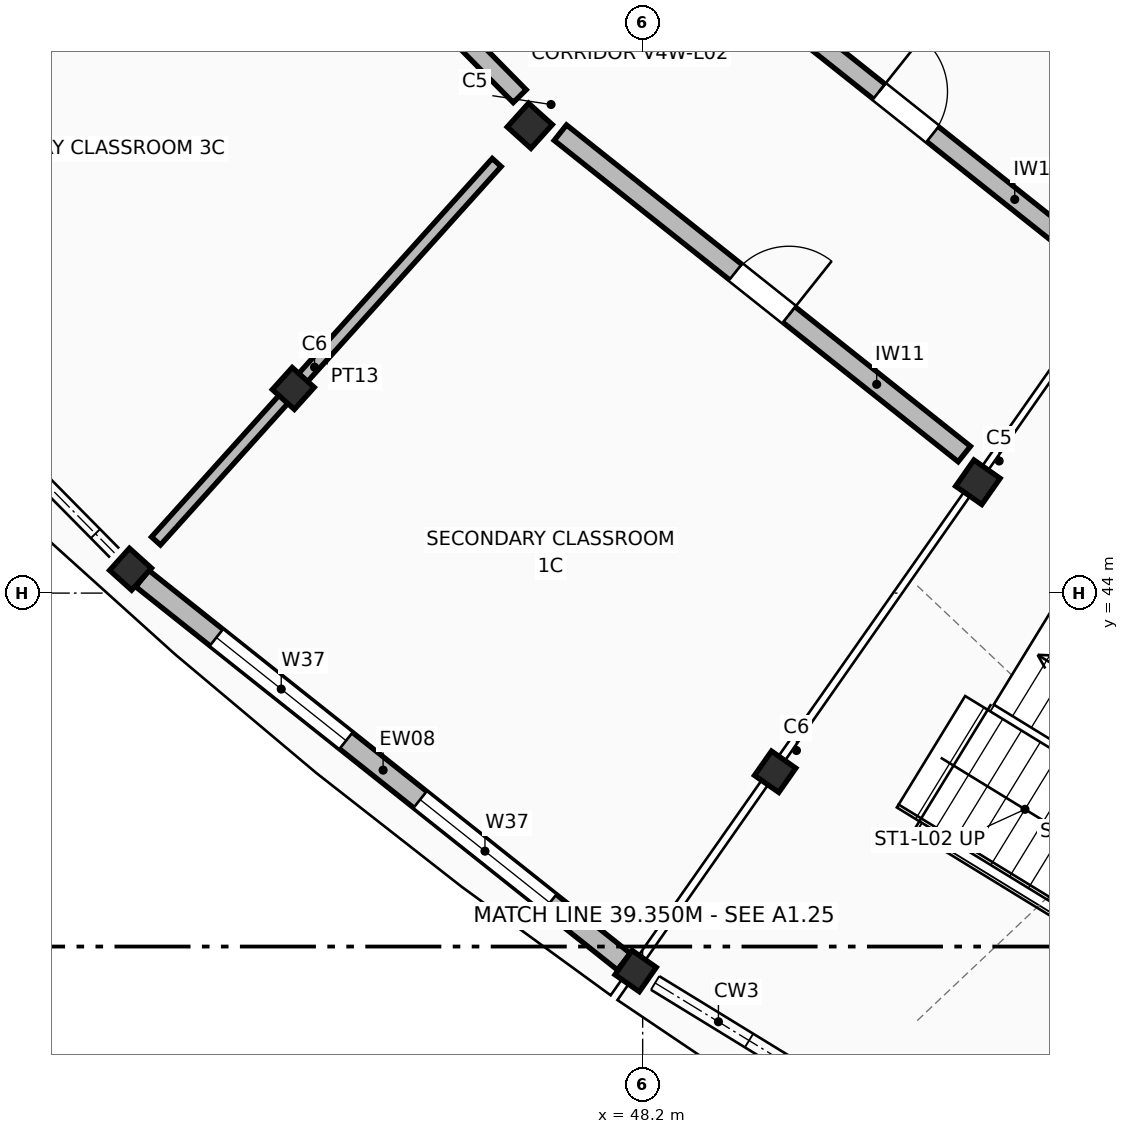
"""IFC4 building model, lengths in metres.
Left out: names, types, materials, properties, quantities, classifications, styles, units other than length and angle.
Written with IfcOpenShell. Run it as: python <this file> out.ifc"""

import sys

from ifc_helpers import new_model, si_unit, direction, frame, frame_2d, origin, origin_2d, place, context, subcontext, project, spatial, rectangle, extrude, element, fill, save


model = new_model("IFC4")
c1 = context("Model", 3, precision=1e-05, world=origin(), true_north=direction((0.0, 1.0)))
c2 = subcontext(c1, "Body", "Model", "MODEL_VIEW")
j1 = project(units=[si_unit("LENGTHUNIT", "METRE"), si_unit("PLANEANGLEUNIT", "RADIAN")], contexts=[c1])
p1 = place(None, origin())
s1 = spatial("IfcSite", under=j1, at=p1, CompositionType="ELEMENT")
p2 = place(p1, origin())
s2 = spatial("IfcBuilding", under=s1, at=p2, CompositionType="ELEMENT")
p3 = place(p2, frame((0.0, 0.0, 8.16)))
s3 = spatial("IfcBuildingStorey", under=s2, at=p3, CompositionType="ELEMENT", Elevation=8.16)
p4 = place(p3, frame((46.715, 50.148, 0.0), z_axis=(0.0, 0.0, 1.0), x_axis=(-0.669130606359, -0.743144825477, 0.0)))
e1 = element("IfcColumn", 1, at=p4, inside=s3, PredefinedType="COLUMN", context=c2, shape_type="SweptSolid", body=[
    extrude(rectangle(XDim=0.42, YDim=0.42, at=origin_2d()), origin(), (0.0, 0.0, 1.0), 3.74),
])
for number, where, z_axis, x_axis in (
    (2, (43.603, 46.692, 0.0), (0.0, 0.0, 1.0), (-0.669, -0.743, 0.0)),
    (3, (41.462, 44.314, 0.0), (0.0, 0.0, 1.0), (-0.669, -0.743, 0.0)),
):
    element("IfcColumn", number, at=place(p3, frame(where, z_axis=z_axis, x_axis=x_axis)), inside=s3, PredefinedType="COLUMN", context=c2, shape_type="SweptSolid", body=[
        extrude(rectangle(XDim=0.39, YDim=0.39, at=origin_2d()), origin(), (0.0, 0.0, 1.0), 3.74),
    ])
p5 = place(p3, frame((52.61, 45.458, 0.0), z_axis=(0.0, 0.0, 1.0), x_axis=(-0.573576436351, -0.819152044289, 0.0)))
e4 = element("IfcColumn", 4, at=p5, inside=s3, PredefinedType="COLUMN", context=c2, shape_type="SweptSolid", body=[
    extrude(rectangle(XDim=0.42, YDim=0.42, at=origin_2d()), origin(), (0.0, 0.0, 1.0), 3.74),
])
for number, where, z_axis, x_axis in (
    (5, (49.943, 41.649, 0.0), (0.0, 0.0, 1.0), (-0.574, -0.819, 0.0)),
    (6, (48.108, 39.028, 0.0), (0.0, 0.0, 1.0), (-0.574, -0.819, 0.0)),
):
    element("IfcColumn", number, at=place(p3, frame(where, z_axis=z_axis, x_axis=x_axis)), inside=s3, PredefinedType="COLUMN", context=c2, shape_type="SweptSolid", body=[
        extrude(rectangle(XDim=0.39, YDim=0.39, at=origin_2d()), origin(), (0.0, 0.0, 1.0), 3.74),
    ])
p6 = place(p3, frame((41.617, 44.191, 0.0), z_axis=(0.0, 0.0, 1.0), x_axis=(0.782610403329, -0.62251181242, 0.0)))
e7 = element("IfcWall", 7, at=p6, inside=s3, PredefinedType="STANDARD", context=c2, shape_type="SweptSolid", body=[
    extrude(rectangle(XDim=8.096, YDim=0.276, at=frame_2d((4.048, 0.0))), origin(), (0.0, 0.0, 1.0), 2.78),
])
p7 = place(p6, frame((1.245, 0.0, 0.95)))
e8 = element("IfcOpeningElement", 8, at=p7, cuts=e7, PredefinedType="OPENING", context=c2, shape_type="SweptSolid", body=[
    extrude(rectangle(XDim=2.18, YDim=1.15, at=frame_2d((1.09, 0.575))), frame((0.0, 0.148, 0.0), z_axis=(0.0, -1.0, 0.0), x_axis=(1.0, 0.0, 0.0)), (0.0, 0.0, 1.0), 0.296),
])
p8 = place(p6, frame((4.671, 0.0, 0.95)))
e9 = element("IfcOpeningElement", 9, at=p8, cuts=e7, PredefinedType="OPENING", context=c2, shape_type="SweptSolid", body=[
    extrude(rectangle(XDim=2.18, YDim=1.15, at=frame_2d((1.09, 0.575))), frame((0.0, 0.148, 0.0), z_axis=(0.0, -1.0, 0.0), x_axis=(1.0, 0.0, 0.0)), (0.0, 0.0, 1.0), 0.296),
])
p9 = place(p3, frame((41.989, 55.193, 0.0), z_axis=(0.0, 0.0, 1.0), x_axis=(0.702368484449, -0.711813537419, 0.0)))
e10 = element("IfcWall", 10, at=p9, inside=s3, PredefinedType="STANDARD", context=c2, shape_type="SweptSolid", body=[
    extrude(rectangle(XDim=6.54, YDim=0.24, at=frame_2d((3.27, 0.0))), origin(), (0.0, 0.0, 1.0), 2.75),
])
p10 = place(p9, frame((2.82, 0.0, 0.0)))
e11 = element("IfcOpeningElement", 11, at=p10, cuts=e10, PredefinedType="OPENING", context=c2, shape_type="SweptSolid", body=[
    extrude(rectangle(XDim=0.9, YDim=2.12, at=frame_2d((0.45, 1.06))), frame((0.0, 0.13, 0.0), z_axis=(0.0, -1.0, 0.0), x_axis=(1.0, 0.0, 0.0)), (0.0, 0.0, 1.0), 0.26),
])
p11 = place(p3, frame((49.151, 52.317, 0.0), z_axis=(0.0, 0.0, 1.0), x_axis=(0.782605685559, -0.622517743467, 0.0)))
e12 = element("IfcWall", 12, at=p11, inside=s3, PredefinedType="STANDARD", context=c2, shape_type="SweptSolid", body=[
    extrude(rectangle(XDim=6.42, YDim=0.25, at=frame_2d((3.21, 0.0))), origin(), (0.0, 0.0, 1.0), 2.75),
])
p12 = place(p11, frame((2.76, 0.0, 0.0)))
e13 = element("IfcOpeningElement", 13, at=p12, cuts=e12, PredefinedType="OPENING", context=c2, shape_type="SweptSolid", body=[
    extrude(rectangle(XDim=0.9, YDim=2.18, at=frame_2d((0.45, 1.09))), frame((0.0, 0.135, 0.0), z_axis=(0.0, -1.0, 0.0), x_axis=(1.0, 0.0, 0.0)), (0.0, 0.0, 1.0), 0.27),
])
p13 = place(p3, frame((47.117, 50.058, 0.0), z_axis=(0.0, 0.0, 1.0), x_axis=(0.782615780998, -0.622505051653, 0.0)))
e14 = element("IfcWall", 14, at=p13, inside=s3, PredefinedType="STANDARD", context=c2, shape_type="SweptSolid", body=[
    extrude(rectangle(XDim=6.792, YDim=0.26, at=frame_2d((3.396, 0.0))), origin(), (0.0, 0.0, 1.0), 2.75),
])
p14 = place(p13, frame((2.946, 0.0, 0.0)))
e15 = element("IfcOpeningElement", 15, at=p14, cuts=e14, PredefinedType="OPENING", context=c2, shape_type="SweptSolid", body=[
    extrude(rectangle(XDim=0.9, YDim=2.24, at=frame_2d((0.45, 1.12))), frame((0.0, 0.14, 0.0), z_axis=(0.0, -1.0, 0.0), x_axis=(1.0, 0.0, 0.0)), (0.0, 0.0, 1.0), 0.28),
])
p15 = place(p3, frame((46.28, 49.665, 0.0), z_axis=(0.0, 0.0, 1.0), x_axis=(-0.669115705072, -0.743158242386, 0.0)))
e16 = element("IfcWall", 16, at=p15, inside=s3, PredefinedType="PARTITIONING", context=c2, shape_type="SweptSolid", body=[
    extrude(rectangle(XDim=6.7, YDim=0.158, at=frame_2d((3.35, 0.0))), origin(), (0.0, 0.0, 1.0), 2.75),
])
p16 = place(p7, origin())
e17 = element("IfcWindow", 17, at=p16, inside=s3, PartitioningType="SINGLE_PANEL", PredefinedType="WINDOW", context=c2, shape_type="SweptSolid", body=[
    extrude(rectangle(XDim=2.18, YDim=1.15, at=frame_2d((1.09, 0.575))), frame((0.0, 0.03, 0.0), z_axis=(0.0, -1.0, 0.0), x_axis=(1.0, 0.0, 0.0)), (0.0, 0.0, 1.0), 0.06),
])
fill(e8, e17)
p17 = place(p8, origin())
e18 = element("IfcWindow", 18, at=p17, inside=s3, PartitioningType="SINGLE_PANEL", PredefinedType="WINDOW", context=c2, shape_type="SweptSolid", body=[
    extrude(rectangle(XDim=2.18, YDim=1.15, at=frame_2d((1.09, 0.575))), frame((0.0, 0.03, 0.0), z_axis=(0.0, -1.0, 0.0), x_axis=(1.0, 0.0, 0.0)), (0.0, 0.0, 1.0), 0.06),
])
fill(e9, e18)
p18 = place(p12, frame((0.9, 0.0, 0.0), z_axis=(0.0, 0.0, 1.0), x_axis=(-1.0, 0.0, 0.0)))
e19 = element("IfcDoor", 19, at=p18, inside=s3, OperationType="SINGLE_SWING_LEFT", PredefinedType="DOOR", context=c2, shape_type="SweptSolid", body=[
    extrude(rectangle(XDim=0.9, YDim=2.18, at=frame_2d((0.45, 1.09))), frame((0.0, 0.025, 0.0), z_axis=(0.0, -1.0, 0.0), x_axis=(1.0, 0.0, 0.0)), (0.0, 0.0, 1.0), 0.05),
])
fill(e13, e19)
p19 = place(p14, origin())
e20 = element("IfcDoor", 20, at=p19, inside=s3, OperationType="SINGLE_SWING_RIGHT", PredefinedType="DOOR", context=c2, shape_type="SweptSolid", body=[
    extrude(rectangle(XDim=0.9, YDim=2.24, at=frame_2d((0.45, 1.12))), frame((0.0, 0.025, 0.0), z_axis=(0.0, -1.0, 0.0), x_axis=(1.0, 0.0, 0.0)), (0.0, 0.0, 1.0), 0.05),
])
fill(e15, e20)
save(model, sys.argv[1])
